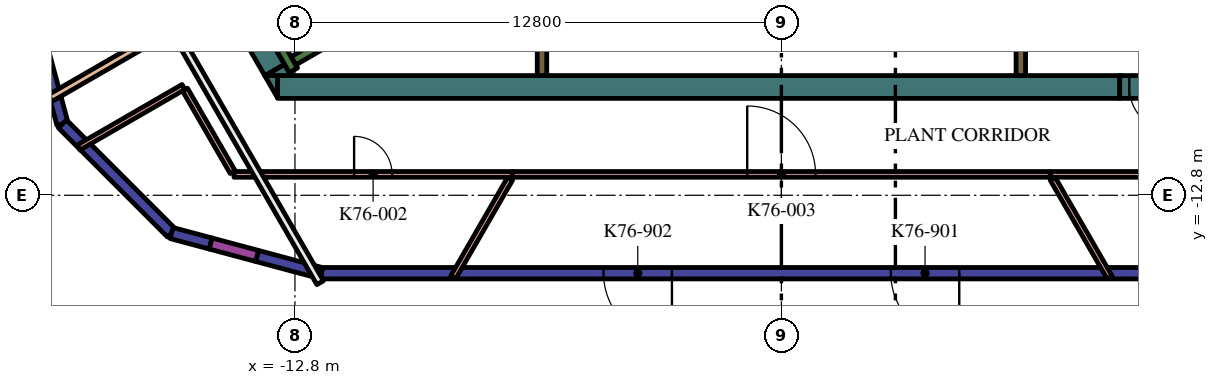
"""IFC4 building model, lengths in metres.
Left out: names, types, materials, properties, quantities, classifications, styles, units other than length and angle.
Written with IfcOpenShell. Run it as: python <this file> out.ifc"""

import sys

from ifc_helpers import new_model, si_unit, direction, frame, frame_2d, origin, place, context, subcontext, project, spatial, polyline, rectangle, outline, extrude, element, fill, save


model = new_model("IFC4")
c1 = context("Model", 3, precision=1e-05, world=origin(), true_north=direction((0.0, 1.0)))
c2 = subcontext(c1, "Body", "Model", "MODEL_VIEW")
j1 = project(units=[si_unit("LENGTHUNIT", "METRE"), si_unit("PLANEANGLEUNIT", "RADIAN")], contexts=[c1])
p1 = place(None, origin())
s1 = spatial("IfcSite", under=j1, at=p1, CompositionType="ELEMENT")
p2 = place(p1, origin())
s2 = spatial("IfcBuilding", under=s1, at=p2, CompositionType="ELEMENT")
p3 = place(p2, frame((0.0, 0.0, 327.6)))
s3 = spatial("IfcBuildingStorey", under=s2, at=p3, CompositionType="ELEMENT", Elevation=327.6)
p4 = place(p3, frame((8.904, -9.95, 0.0), z_axis=(0.0, 0.0, 1.0), x_axis=(-1.0, 0.0, 0.0)))
e1 = element("IfcWall", 1, at=p4, inside=s3, PredefinedType="SOLIDWALL", context=c2, shape_type="SweptSolid", body=[
    extrude(rectangle(XDim=22.161, YDim=0.6, at=frame_2d((11.081, 0.0))), origin(), (0.0, 0.0, 1.0), 4.2),
])
p5 = place(p3, origin())
e2 = element("IfcWall", 2, at=p5, inside=s3, PredefinedType="SOLIDWALL", context=c2, shape_type="SweptSolid", body=[
    extrude(outline(polyline([(-13.597, -9.65), (-13.259, -9.65), (-13.259, -10.236), (-13.597, -9.65)])), origin(), (0.0, 0.0, 1.0), 4.2),
])
p6 = place(p3, frame((-13.333, -9.506, 0.0), z_axis=(0.0, 0.0, 1.0), x_axis=(-0.500019073792, 0.866014391245, 0.0)))
e3 = element("IfcWall", 3, at=p6, inside=s3, PredefinedType="SOLIDWALL", context=c2, shape_type="SweptSolid", body=[
    extrude(rectangle(XDim=3.823, YDim=0.6, at=frame_2d((1.912, 0.0))), origin(), (0.0, 0.0, 1.0), 4.2),
])
e4 = element("IfcWall", 4, at=p5, inside=s3, PredefinedType="SOLIDWALL", context=c2, shape_type="SweptSolid", body=[
    extrude(outline(polyline([(-12.904, -9.65), (-13.58, -9.65), (-13.073, -9.357), (-12.904, -9.65)])), origin(), (0.0, 0.0, 1.0), 4.2),
])
p7 = place(p3, frame((12.84, -9.261, 0.0), z_axis=(0.0, 0.0, 1.0), x_axis=(-0.866013990052, 0.500019768644, 0.0)))
e5 = element("IfcWall", 5, at=p7, inside=s3, PredefinedType="SOLIDWALL", context=c2, shape_type="SweptSolid", body=[
    extrude(rectangle(XDim=6.8, YDim=0.25, at=frame_2d((3.4, 0.0))), origin(), (0.0, 0.0, 1.0), 4.2),
])
p8 = place(p3, frame((-12.84, -9.511, 0.0), z_axis=(0.0, 0.0, 1.0), x_axis=(-0.499997733992, 0.866026712061, 0.0)))
e6 = element("IfcWall", 6, at=p8, inside=s3, PredefinedType="SOLIDWALL", context=c2, shape_type="SweptSolid", body=[
    extrude(rectangle(XDim=3.634, YDim=0.25, at=frame_2d((1.817, 0.0))), origin(), (0.0, 0.0, 1.0), 4.2),
])
p9 = place(p3, frame((-12.84, -9.261, 0.0), z_axis=(0.0, 0.0, 1.0), x_axis=(0.866016039709, 0.500016218704, 0.0)))
e7 = element("IfcWall", 7, at=p9, inside=s3, PredefinedType="SOLIDWALL", context=c2, shape_type="SweptSolid", body=[
    extrude(rectangle(XDim=7.05, YDim=0.25, at=frame_2d((3.525, 0.0))), origin(), (0.0, 0.0, 1.0), 4.2),
])
p10 = place(p3, frame((6.3, -9.65, 0.0), z_axis=(0.0, 0.0, 1.0), x_axis=(0.0, 1.0, 0.0)))
e8 = element("IfcWall", 8, at=p10, inside=s3, PredefinedType="SOLIDWALL", context=c2, shape_type="SweptSolid", body=[
    extrude(rectangle(XDim=1.008, YDim=0.25, at=frame_2d((0.504, 0.0))), origin(), (0.0, 0.0, 1.0), 4.2),
])
p11 = place(p3, frame((-6.3, -8.925, 0.0), z_axis=(0.0, 0.0, 1.0), x_axis=(0.0, -1.0, 0.0)))
e9 = element("IfcWall", 9, at=p11, inside=s3, PredefinedType="SOLIDWALL", context=c2, shape_type="SweptSolid", body=[
    extrude(rectangle(XDim=0.725, YDim=0.25, at=frame_2d((0.363, 0.0))), origin(), (0.0, 0.0, 1.0), 4.2),
])
p12 = place(p3, frame((10.604, -9.95, 0.0), z_axis=(0.0, 0.0, 1.0), x_axis=(-1.0, 0.0, 0.0)))
e10 = element("IfcWall", 10, at=p12, inside=s3, PredefinedType="SOLIDWALL", context=c2, shape_type="SweptSolid", body=[
    extrude(rectangle(XDim=1.7, YDim=0.6, at=frame_2d((0.85, 0.0))), origin(), (0.0, 0.0, 1.0), 4.2),
])
p13 = place(p12, frame((0.25, 0.0, 0.0)))
e11 = element("IfcOpeningElement", 11, at=p13, cuts=e10, PredefinedType="OPENING", context=c2, shape_type="SweptSolid", body=[
    extrude(rectangle(XDim=1.2, YDim=2.1, at=frame_2d((0.6, 1.05))), frame((0.0, 0.31, 0.0), z_axis=(0.0, -1.0, 0.0), x_axis=(1.0, 0.0, 0.0)), (0.0, 0.0, 1.0), 0.62),
])
p14 = place(p3, frame((-7.073, -12.25, 0.0), z_axis=(0.0, 0.0, 1.0), x_axis=(1.0, 0.0, 0.0)))
e12 = element("IfcWall", 12, at=p14, inside=s3, PredefinedType="PARTITIONING", context=c2, shape_type="SweptSolid", body=[
    extrude(rectangle(XDim=14.146, YDim=0.15, at=frame_2d((7.073, 0.0))), origin(), (0.0, 0.0, 1.0), 3.45),
])
p15 = place(p14, frame((6.173, 0.0, 0.0)))
e13 = element("IfcOpeningElement", 13, at=p15, cuts=e12, PredefinedType="OPENING", context=c2, shape_type="SweptSolid", body=[
    extrude(rectangle(XDim=1.8, YDim=2.1, at=frame_2d((0.9, 1.05))), frame((0.0, 0.085, 0.0), z_axis=(0.0, -1.0, 0.0), x_axis=(1.0, 0.0, 0.0)), (0.0, 0.0, 1.0), 0.17),
])
p16 = place(p3, frame((-14.405, -12.25, 0.0), z_axis=(0.0, 0.0, 1.0), x_axis=(1.0, 0.0, 0.0)))
e14 = element("IfcWall", 14, at=p16, inside=s3, PredefinedType="PARTITIONING", context=c2, shape_type="SweptSolid", body=[
    extrude(rectangle(XDim=7.323, YDim=0.15, at=frame_2d((3.661, 0.0))), origin(), (0.0, 0.0, 1.0), 3.45),
])
p17 = place(p16, frame((3.161, 0.0, 0.0)))
e15 = element("IfcOpeningElement", 15, at=p17, cuts=e14, PredefinedType="OPENING", context=c2, shape_type="SweptSolid", body=[
    extrude(rectangle(XDim=1.0, YDim=2.1, at=frame_2d((0.5, 1.05))), frame((0.0, 0.085, 0.0), z_axis=(0.0, -1.0, 0.0), x_axis=(1.0, 0.0, 0.0)), (0.0, 0.0, 1.0), 0.17),
])
p18 = place(p3, frame((7.082, -12.25, 0.0), z_axis=(0.0, 0.0, 1.0), x_axis=(1.0, 0.0, 0.0)))
e16 = element("IfcWall", 16, at=p18, inside=s3, PredefinedType="PARTITIONING", context=c2, shape_type="SweptSolid", body=[
    extrude(rectangle(XDim=7.323, YDim=0.15, at=frame_2d((3.661, 0.0))), origin(), (0.0, 0.0, 1.0), 3.45),
])
p19 = place(p18, frame((3.161, 0.0, 0.0)))
e17 = element("IfcOpeningElement", 17, at=p19, cuts=e16, PredefinedType="OPENING", context=c2, shape_type="SweptSolid", body=[
    extrude(rectangle(XDim=1.0, YDim=2.1, at=frame_2d((0.5, 1.05))), frame((0.0, 0.085, 0.0), z_axis=(0.0, -1.0, 0.0), x_axis=(1.0, 0.0, 0.0)), (0.0, 0.0, 1.0), 0.17),
])
p20 = place(p3, frame((-19.244, -10.245, 0.0), z_axis=(0.0, 0.0, 1.0), x_axis=(0.866019818373, 0.500009674092, 0.0)))
e18 = element("IfcWall", 18, at=p20, inside=s3, PredefinedType="PARTITIONING", context=c2, shape_type="SweptSolid", body=[
    extrude(rectangle(XDim=3.188, YDim=0.2, at=frame_2d((1.594, 0.0))), origin(), (0.0, 0.0, 1.0), 3.45),
])
p21 = place(p3, frame((-15.733, -9.949, 0.0), z_axis=(0.0, 0.0, 1.0), x_axis=(-0.866019818373, -0.500009674092, 0.0)))
e19 = element("IfcWall", 19, at=p21, inside=s3, PredefinedType="PARTITIONING", context=c2, shape_type="SweptSolid", body=[
    extrude(rectangle(XDim=3.188, YDim=0.15, at=frame_2d((1.594, 0.0))), origin(), (0.0, 0.0, 1.0), 3.45),
])
for number, where, z_axis, x_axis in (
    (20, (7.137, -12.363, 0.0), (0.0, 0.0, 1.0), (0.5, -0.866, 0.0)),
    (21, (-7.137, -12.363, 0.0), (0.0, 0.0, 1.0), (-0.5, -0.866, 0.0)),
):
    element("IfcWall", number, at=place(p3, frame(where, z_axis=z_axis, x_axis=x_axis)), inside=s3, PredefinedType="PARTITIONING", context=c2, shape_type="SweptSolid", body=[
        extrude(rectangle(XDim=2.999, YDim=0.15, at=frame_2d((1.5, 0.0))), origin(), (0.0, 0.0, 1.0), 3.45),
    ])
p22 = place(p3, frame((-14.44, -12.189, 0.0), z_axis=(0.0, 0.0, 1.0), x_axis=(-0.499983837127, 0.866034735222, 0.0)))
e22 = element("IfcWall", 22, at=p22, inside=s3, PredefinedType="PARTITIONING", context=c2, shape_type="SweptSolid", body=[
    extrude(rectangle(XDim=2.506, YDim=0.15, at=frame_2d((1.253, 0.0))), origin(), (0.0, 0.0, 1.0), 3.45),
])
p23 = place(p3, frame((12.105, -14.85, 0.0), z_axis=(0.0, 0.0, 1.0), x_axis=(-1.0, 0.0, 0.0)))
e23 = element("IfcWall", 23, at=p23, inside=s3, PredefinedType="SOLIDWALL", context=c2, shape_type="SweptSolid", body=[
    extrude(rectangle(XDim=24.209, YDim=0.3, at=frame_2d((12.105, 0.0))), origin(), (0.0, 0.0, 1.0), 3.95),
])
p24 = place(p23, frame((7.425, 0.0, 0.0)))
e24 = element("IfcOpeningElement", 24, at=p24, cuts=e23, PredefinedType="OPENING", context=c2, shape_type="SweptSolid", body=[
    extrude(rectangle(XDim=1.8, YDim=2.1, at=frame_2d((0.9, 1.05))), frame((0.0, 0.16, 0.0), z_axis=(0.0, -1.0, 0.0), x_axis=(1.0, 0.0, 0.0)), (0.0, 0.0, 1.0), 0.32),
])
p25 = place(p23, frame((14.985, 0.0, 0.0)))
e25 = element("IfcOpeningElement", 25, at=p25, cuts=e23, PredefinedType="OPENING", context=c2, shape_type="SweptSolid", body=[
    extrude(rectangle(XDim=1.8, YDim=2.1, at=frame_2d((0.9, 1.05))), frame((0.0, 0.16, 0.0), z_axis=(0.0, -1.0, 0.0), x_axis=(1.0, 0.0, 0.0)), (0.0, 0.0, 1.0), 0.32),
])
for number, where, z_axis, x_axis in (
    (26, (-19.969, -7.0, 0.0), (0.0, 0.0, 1.0), (0.259, -0.966, 0.0)),
    (27, (-18.918, -10.922, 0.0), (0.0, 0.0, 1.0), (0.707, -0.707, 0.0)),
):
    element("IfcWall", number, at=place(p3, frame(where, z_axis=z_axis, x_axis=x_axis)), inside=s3, PredefinedType="SOLIDWALL", context=c2, shape_type="SweptSolid", body=[
        extrude(rectangle(XDim=4.061, YDim=0.3, at=frame_2d((2.03, 0.0))), origin(), (0.0, 0.0, 1.0), 3.95),
    ])
p26 = place(p3, frame((-16.047, -13.794, 0.0), z_axis=(0.0, 0.0, 1.0), x_axis=(0.965918371587, -0.258846864828, 0.0)))
e28 = element("IfcWall", 28, at=p26, inside=s3, PredefinedType="SOLIDWALL", context=c2, shape_type="SweptSolid", body=[
    extrude(rectangle(XDim=1.065, YDim=0.3, at=frame_2d((0.532, 0.0))), origin(), (0.0, 0.0, 1.0), 3.95),
])
p27 = place(p3, frame((-15.018, -14.069, 0.0), z_axis=(0.0, 0.0, 1.0), x_axis=(0.965926498018, -0.258816538161, 0.0)))
e29 = element("IfcWall", 29, at=p27, inside=s3, PredefinedType="SOLIDWALL", context=c2, shape_type="SweptSolid", body=[
    extrude(rectangle(XDim=1.264, YDim=0.3, at=frame_2d((0.632, 0.0))), origin(), (0.0, 0.0, 1.0), 3.45),
])
p28 = place(p3, frame((-13.797, -14.396, 0.0), z_axis=(0.0, 0.0, 1.0), x_axis=(0.965915089044, -0.258859113723, 0.0)))
e30 = element("IfcWall", 30, at=p28, inside=s3, PredefinedType="SOLIDWALL", context=c2, shape_type="SweptSolid", body=[
    extrude(rectangle(XDim=1.752, YDim=0.3, at=frame_2d((0.876, 0.0))), origin(), (0.0, 0.0, 1.0), 3.95),
])
p29 = place(p13, origin())
e31 = element("IfcDoor", 31, at=p29, inside=s3, OperationType="SINGLE_SWING_LEFT", PredefinedType="DOOR", context=c2, shape_type="SweptSolid", body=[
    extrude(rectangle(XDim=1.2, YDim=2.1, at=frame_2d((0.6, 1.05))), frame((0.0, 0.025, 0.0), z_axis=(0.0, -1.0, 0.0), x_axis=(1.0, 0.0, 0.0)), (0.0, 0.0, 1.0), 0.05),
])
fill(e11, e31)
p30 = place(p17, origin())
e32 = element("IfcDoor", 32, at=p30, inside=s3, OperationType="SINGLE_SWING_RIGHT", PredefinedType="DOOR", context=c2, shape_type="SweptSolid", body=[
    extrude(rectangle(XDim=1.0, YDim=2.1, at=frame_2d((0.5, 1.05))), frame((0.0, 0.025, 0.0), z_axis=(0.0, -1.0, 0.0), x_axis=(1.0, 0.0, 0.0)), (0.0, 0.0, 1.0), 0.05),
])
fill(e15, e32)
p31 = place(p15, origin())
e33 = element("IfcDoor", 33, at=p31, inside=s3, OperationType="DOUBLE_DOOR_SINGLE_SWING", PredefinedType="DOOR", context=c2, shape_type="SweptSolid", body=[
    extrude(rectangle(XDim=1.8, YDim=2.1, at=frame_2d((0.9, 1.05))), frame((0.0, 0.025, 0.0), z_axis=(0.0, -1.0, 0.0), x_axis=(1.0, 0.0, 0.0)), (0.0, 0.0, 1.0), 0.05),
])
fill(e13, e33)
p32 = place(p24, origin())
e34 = element("IfcDoor", 34, at=p32, inside=s3, OperationType="DOUBLE_DOOR_SINGLE_SWING", PredefinedType="DOOR", context=c2, shape_type="SweptSolid", body=[
    extrude(rectangle(XDim=1.8, YDim=2.1, at=frame_2d((0.9, 1.05))), frame((0.0, 0.025, 0.0), z_axis=(0.0, -1.0, 0.0), x_axis=(1.0, 0.0, 0.0)), (0.0, 0.0, 1.0), 0.05),
])
fill(e24, e34)
p33 = place(p25, origin())
e35 = element("IfcDoor", 35, at=p33, inside=s3, OperationType="DOUBLE_DOOR_SINGLE_SWING", PredefinedType="DOOR", context=c2, shape_type="SweptSolid", body=[
    extrude(rectangle(XDim=1.8, YDim=2.1, at=frame_2d((0.9, 1.05))), frame((0.0, 0.025, 0.0), z_axis=(0.0, -1.0, 0.0), x_axis=(1.0, 0.0, 0.0)), (0.0, 0.0, 1.0), 0.05),
])
fill(e25, e35)
save(model, sys.argv[1])
